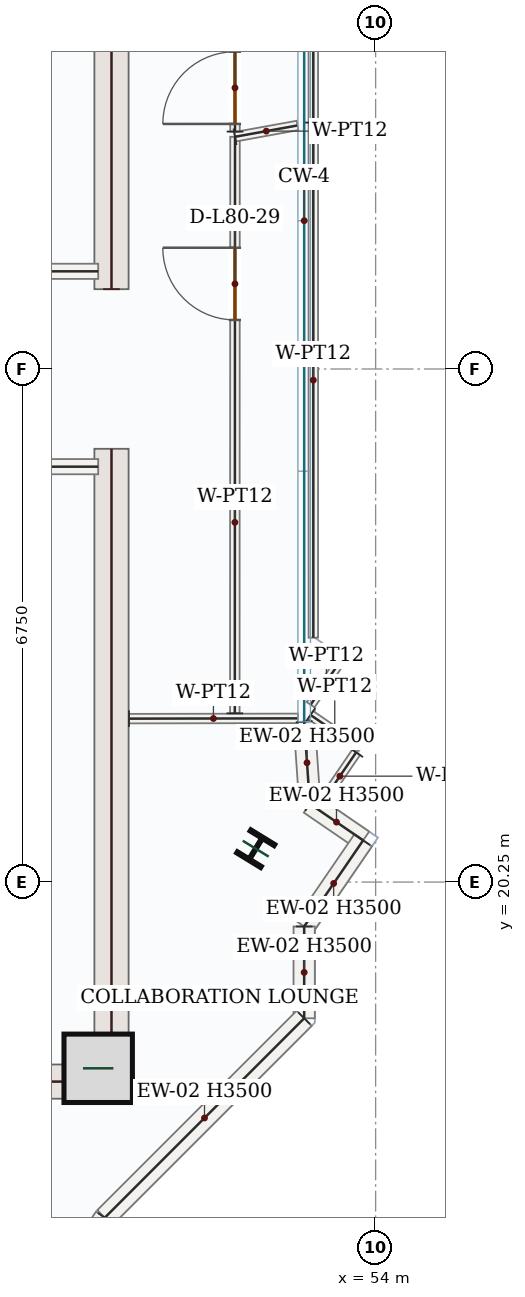
"""IFC4 building model, lengths in metres.
Left out: names, types, materials, properties, quantities, classifications, styles, units other than length and angle.
Written with IfcOpenShell. Run it as: python <this file> out.ifc"""

import sys

from ifc_helpers import new_model, si_unit, direction, frame, frame_2d, origin, origin_2d, place, context, subcontext, project, spatial, rectangle, i_section, extrude, source, transform, mapped, element, fill, save


model = new_model("IFC4")
c1 = context("Model", 3, precision=1e-05, world=origin(), true_north=direction((0.0, 1.0)))
c2 = subcontext(c1, "Body", "Model", "MODEL_VIEW")
j1 = project(units=[si_unit("LENGTHUNIT", "METRE"), si_unit("PLANEANGLEUNIT", "RADIAN")], contexts=[c1])
p1 = place(None, origin())
s1 = spatial("IfcSite", under=j1, at=p1, CompositionType="ELEMENT")
p2 = place(p1, origin())
s2 = spatial("IfcBuilding", under=s1, at=p2, CompositionType="ELEMENT")
p3 = place(p2, frame((0.0, 0.0, 331.05)))
s3 = spatial("IfcBuildingStorey", under=s2, at=p3, CompositionType="ELEMENT", Elevation=331.05)
m1 = source(origin(), c2, "Body", "SweptSolid", [
    extrude(rectangle(XDim=8.55, YDim=0.45, at=frame_2d((4.275, 0.0))), origin(), (0.0, 0.0, 1.0), 3.5),
])
for number, where, z_axis, x_axis in (
    (1, (50.525, 17.4, 0.0), (0.0, 0.0, 1.0), (0.0, 1.0, 0.0)),
    (2, (50.525, 28.05, 0.0), (0.0, 0.0, 1.0), (0.0, 1.0, 0.0)),
):
    element("IfcWall", number, at=place(p3, frame(where, z_axis=z_axis, x_axis=x_axis)), inside=s3, PredefinedType="SHEAR", context=c2, shape_type="MappedRepresentation", body=[
        mapped(m1, transform((0.0, 0.0, 0.0), x_axis=(1.0, 0.0, 0.0), y_axis=(0.0, 1.0, 0.0), z_axis=(0.0, 0.0, 1.0), scale=1.0)),
    ])
m2 = source(origin(), c2, "Body", "SweptSolid", [
    extrude(rectangle(XDim=7.1, YDim=0.45, at=frame_2d((3.55, 0.0))), origin(), (0.0, 0.0, 1.0), 3.5),
])
p4 = place(p3, frame((43.2, 17.625, 0.0), z_axis=(0.0, 0.0, 1.0), x_axis=(1.0, 0.0, 0.0)))
e3 = element("IfcWall", 3, at=p4, inside=s3, PredefinedType="SHEAR", context=c2, shape_type="MappedRepresentation", body=[
    mapped(m2, transform((0.0, 0.0, 0.0), x_axis=(1.0, 0.0, 0.0), y_axis=(0.0, 1.0, 0.0), z_axis=(0.0, 0.0, 1.0), scale=1.0)),
])
m3 = source(origin(), c2, "Body", "SweptSolid", [
    extrude(rectangle(XDim=0.9, YDim=0.9, at=origin_2d()), origin(), (0.0, 0.0, 1.0), 3.75),
])
p5 = place(p3, frame((50.35, 17.8, 0.0), z_axis=(0.0, 0.0, 1.0), x_axis=(1.0, 0.0, 0.0)))
e4 = element("IfcColumn", 4, at=p5, inside=s3, PredefinedType="COLUMN", context=c2, shape_type="MappedRepresentation", body=[
    mapped(m3, transform((0.0, 0.0, 0.0), x_axis=(1.0, 0.0, 0.0), y_axis=(0.0, 1.0, 0.0), z_axis=(0.0, 0.0, 1.0), scale=1.0)),
])
m4 = source(origin(), c2, "Body", "SweptSolid", [
    extrude(i_section(OverallWidth=0.369, OverallDepth=0.356, WebThickness=0.011, FlangeThickness=0.018, FilletRadius=0.018, at=origin_2d()), origin(), (0.0, 0.0, 1.0), 3.75),
])
p6 = place(p3, frame((52.423, 20.689, 0.0), z_axis=(0.0, 0.0, 1.0), x_axis=(-0.852640164354, 0.522498564716, 0.0)))
e5 = element("IfcColumn", 5, at=p6, inside=s3, PredefinedType="COLUMN", context=c2, shape_type="MappedRepresentation", body=[
    mapped(m4, transform((0.0, 0.0, 0.0), x_axis=(1.0, 0.0, 0.0), y_axis=(0.0, 1.0, 0.0), z_axis=(0.0, 0.0, 1.0), scale=1.0)),
])
m5 = source(origin(), c2, "Body", "SweptSolid", [
    extrude(rectangle(XDim=1.083, YDim=0.28, at=frame_2d((0.542, 0.0))), origin(), (0.0, 0.0, 1.0), 3.5),
])
p7 = place(p3, frame((53.06, 22.36, 0.0), z_axis=(0.0, 0.0, 1.0), x_axis=(0.068717036618, -0.997636190642, 0.0)))
e6 = element("IfcWall", 6, at=p7, inside=s3, PredefinedType="SOLIDWALL", context=c2, shape_type="MappedRepresentation", body=[
    mapped(m5, transform((0.0, 0.0, 0.0), x_axis=(1.0, 0.0, 0.0), y_axis=(0.0, 1.0, 0.0), z_axis=(0.0, 0.0, 1.0), scale=1.0)),
])
m6 = source(origin(), c2, "Body", "SweptSolid", [
    extrude(rectangle(XDim=0.85, YDim=0.28, at=frame_2d((0.425, 0.0))), origin(), (0.0, 0.0, 1.0), 3.5),
])
p8 = place(p3, frame((53.135, 21.279, 0.0), z_axis=(0.0, 0.0, 1.0), x_axis=(0.825046459993, -0.565064897913, 0.0)))
e7 = element("IfcWall", 7, at=p8, inside=s3, PredefinedType="SOLIDWALL", context=c2, shape_type="MappedRepresentation", body=[
    mapped(m6, transform((0.0, 0.0, 0.0), x_axis=(1.0, 0.0, 0.0), y_axis=(0.0, 1.0, 0.0), z_axis=(0.0, 0.0, 1.0), scale=1.0)),
])
m7 = source(origin(), c2, "Body", "SweptSolid", [
    extrude(rectangle(XDim=1.373, YDim=0.28, at=frame_2d((0.687, 0.0))), origin(), (0.0, 0.0, 1.0), 3.5),
])
p9 = place(p3, frame((53.836, 20.799, 0.0), z_axis=(0.0, 0.0, 1.0), x_axis=(-0.564875120833, -0.825176404088, 0.0)))
e8 = element("IfcWall", 8, at=p9, inside=s3, PredefinedType="SOLIDWALL", context=c2, shape_type="MappedRepresentation", body=[
    mapped(m7, transform((0.0, 0.0, 0.0), x_axis=(1.0, 0.0, 0.0), y_axis=(0.0, 1.0, 0.0), z_axis=(0.0, 0.0, 1.0), scale=1.0)),
])
m8 = source(origin(), c2, "Body", "SweptSolid", [
    extrude(rectangle(XDim=1.208, YDim=0.28, at=frame_2d((0.604, 0.0))), origin(), (0.0, 0.0, 1.0), 3.5),
])
p10 = place(p3, frame((53.06, 19.666, 0.0), z_axis=(0.0, 0.0, 1.0), x_axis=(0.0, -1.0, 0.0)))
e9 = element("IfcWall", 9, at=p10, inside=s3, PredefinedType="SOLIDWALL", context=c2, shape_type="MappedRepresentation", body=[
    mapped(m8, transform((0.0, 0.0, 0.0), x_axis=(1.0, 0.0, 0.0), y_axis=(0.0, 1.0, 0.0), z_axis=(0.0, 0.0, 1.0), scale=1.0)),
])
m9 = source(origin(), c2, "Body", "SweptSolid", [
    extrude(rectangle(XDim=3.709, YDim=0.28, at=frame_2d((1.855, 0.0))), origin(), (0.0, 0.0, 1.0), 3.5),
])
p11 = place(p3, frame((53.06, 18.458, 0.0), z_axis=(0.0, 0.0, 1.0), x_axis=(-0.707106781187, -0.707106781187, 0.0)))
e10 = element("IfcWall", 10, at=p11, inside=s3, PredefinedType="SOLIDWALL", context=c2, shape_type="MappedRepresentation", body=[
    mapped(m9, transform((0.0, 0.0, 0.0), x_axis=(1.0, 0.0, 0.0), y_axis=(0.0, 1.0, 0.0), z_axis=(0.0, 0.0, 1.0), scale=1.0)),
])
p12 = place(p3, frame((50.437, 15.835, 0.0), z_axis=(0.0, 0.0, 1.0), x_axis=(-0.564961879511, -0.825117006672, 0.0)))
e11 = element("IfcWall", 11, at=p12, inside=s3, PredefinedType="SOLIDWALL", context=c2, shape_type="SweptSolid", body=[
    extrude(rectangle(XDim=3.904, YDim=0.28, at=frame_2d((1.952, 0.0))), origin(), (0.0, 0.0, 1.0), 3.5),
])
p13 = place(p12, frame((1.202, 0.0, 0.85)))
e12 = element("IfcOpeningElement", 12, at=p13, cuts=e11, PredefinedType="OPENING", context=c2, shape_type="SweptSolid", body=[
    extrude(rectangle(XDim=1.5, YDim=1.5, at=frame_2d((0.75, 0.75))), frame((0.0, 0.15, 0.0), z_axis=(0.0, -1.0, 0.0), x_axis=(1.0, 0.0, 0.0)), (0.0, 0.0, 1.0), 0.3),
])
m10 = source(origin(), c2, "Body", "SweptSolid", [
    extrude(rectangle(XDim=4.25, YDim=0.2, at=frame_2d((2.125, 0.0))), origin(), (0.0, 0.0, 1.0), 3.5),
])
for number, where, z_axis, x_axis in (
    (13, (46.1, 25.715, 0.0), (0.0, 0.0, 1.0), (1.0, 0.0, 0.0)),
    (14, (46.1, 28.285, 0.0), (0.0, 0.0, 1.0), (1.0, 0.0, 0.0)),
):
    element("IfcWall", number, at=place(p3, frame(where, z_axis=z_axis, x_axis=x_axis)), inside=s3, PredefinedType="SOLIDWALL", context=c2, shape_type="MappedRepresentation", body=[
        mapped(m10, transform((0.0, 0.0, 0.0), x_axis=(1.0, 0.0, 0.0), y_axis=(0.0, 1.0, 0.0), z_axis=(0.0, 0.0, 1.0), scale=1.0)),
    ])
m11 = source(origin(), c2, "Body", "SweptSolid", [
    extrude(rectangle(XDim=2.223, YDim=0.125, at=frame_2d((1.111, 0.0))), origin(), (0.0, 0.0, 1.0), 3.5),
])
p14 = place(p3, frame((50.755, 22.4, 0.0), z_axis=(0.0, 0.0, 1.0), x_axis=(0.999998642665, 0.00164762518, 0.0)))
e15 = element("IfcWall", 15, at=p14, inside=s3, PredefinedType="PARTITIONING", context=c2, shape_type="MappedRepresentation", body=[
    mapped(m11, transform((0.0, 0.0, 0.0), x_axis=(1.0, 0.0, 0.0), y_axis=(0.0, 1.0, 0.0), z_axis=(0.0, 0.0, 1.0), scale=1.0)),
])
p15 = place(p3, frame((52.147, 22.47, 0.0), z_axis=(0.0, 0.0, 1.0), x_axis=(0.000321874581, 0.999999948198, 0.0)))
e16 = element("IfcWall", 16, at=p15, inside=s3, PredefinedType="PARTITIONING", context=c2, shape_type="SweptSolid", body=[
    extrude(rectangle(XDim=7.585, YDim=0.125, at=frame_2d((3.792, 0.0))), origin(), (0.0, 0.0, 1.0), 3.5),
])
p16 = place(p15, frame((5.175, 0.0, 0.0)))
e17 = element("IfcOpeningElement", 17, at=p16, cuts=e16, PredefinedType="OPENING", context=c2, shape_type="SweptSolid", body=[
    extrude(rectangle(XDim=0.95, YDim=2.15, at=frame_2d((0.475, 1.075))), frame((0.0, 0.073, 0.0), z_axis=(0.0, -1.0, 0.0), x_axis=(1.0, 0.0, 0.0)), (0.0, 0.0, 1.0), 0.145),
])
m12 = source(origin(), c2, "Body", "SweptSolid", [
    extrude(rectangle(XDim=0.836, YDim=0.125, at=frame_2d((0.418, 0.0))), origin(), (0.0, 0.0, 1.0), 3.5),
])
p17 = place(p3, frame((52.15, 30.055, 0.0), z_axis=(0.0, 0.0, 1.0), x_axis=(0.983949253333, 0.178448499195, 0.0)))
e18 = element("IfcWall", 18, at=p17, inside=s3, PredefinedType="PARTITIONING", context=c2, shape_type="MappedRepresentation", body=[
    mapped(m12, transform((0.0, 0.0, 0.0), x_axis=(1.0, 0.0, 0.0), y_axis=(0.0, 1.0, 0.0), z_axis=(0.0, 0.0, 1.0), scale=1.0)),
])
m13 = source(origin(), c2, "Body", "SweptSolid", [
    extrude(rectangle(XDim=6.777, YDim=0.125, at=frame_2d((3.388, 0.0))), origin(), (0.0, 0.0, 1.0), 3.5),
])
p18 = place(p3, frame((53.18, 30.242, 0.0), z_axis=(0.0, 0.0, 1.0), x_axis=(7.2053896e-05, -0.999999997404, 0.0)))
e19 = element("IfcWall", 19, at=p18, inside=s3, PredefinedType="PARTITIONING", context=c2, shape_type="MappedRepresentation", body=[
    mapped(m13, transform((0.0, 0.0, 0.0), x_axis=(1.0, 0.0, 0.0), y_axis=(0.0, 1.0, 0.0), z_axis=(0.0, 0.0, 1.0), scale=1.0)),
])
m14 = source(origin(), c2, "Body", "SweptSolid", [
    extrude(rectangle(XDim=0.738, YDim=0.125, at=frame_2d((0.369, 0.0))), origin(), (0.0, 0.0, 1.0), 3.5),
])
p19 = place(p3, frame((53.56, 23.193, 0.0), z_axis=(0.0, 0.0, 1.0), x_axis=(-0.563069892808, -0.826409278634, 0.0)))
e20 = element("IfcWall", 20, at=p19, inside=s3, PredefinedType="PARTITIONING", context=c2, shape_type="MappedRepresentation", body=[
    mapped(m14, transform((0.0, 0.0, 0.0), x_axis=(1.0, 0.0, 0.0), y_axis=(0.0, 1.0, 0.0), z_axis=(0.0, 0.0, 1.0), scale=1.0)),
])
m15 = source(origin(), c2, "Body", "SweptSolid", [
    extrude(rectangle(XDim=0.773, YDim=0.125, at=frame_2d((0.387, 0.0))), origin(), (0.0, 0.0, 1.0), 3.5),
])
p20 = place(p3, frame((53.143, 22.448, 0.0), z_axis=(0.0, 0.0, 1.0), x_axis=(0.825237562889, -0.56478576894, 0.0)))
e21 = element("IfcWall", 21, at=p20, inside=s3, PredefinedType="PARTITIONING", context=c2, shape_type="MappedRepresentation", body=[
    mapped(m15, transform((0.0, 0.0, 0.0), x_axis=(1.0, 0.0, 0.0), y_axis=(0.0, 1.0, 0.0), z_axis=(0.0, 0.0, 1.0), scale=1.0)),
])
m16 = source(origin(), c2, "Body", "SweptSolid", [
    extrude(rectangle(XDim=0.757, YDim=0.125, at=frame_2d((0.379, 0.0))), origin(), (0.0, 0.0, 1.0), 3.5),
])
p21 = place(p3, frame((53.743, 21.956, 0.0), z_axis=(0.0, 0.0, 1.0), x_axis=(-0.564406554972, -0.825496965896, 0.0)))
e22 = element("IfcWall", 22, at=p21, inside=s3, PredefinedType="PARTITIONING", context=c2, shape_type="MappedRepresentation", body=[
    mapped(m16, transform((0.0, 0.0, 0.0), x_axis=(1.0, 0.0, 0.0), y_axis=(0.0, 1.0, 0.0), z_axis=(0.0, 0.0, 1.0), scale=1.0)),
])
m17 = source(origin(), c2, "Body", "SweptSolid", [
    extrude(rectangle(XDim=5.35, YDim=0.125, at=frame_2d((2.675, 0.0))), origin(), (0.0, 0.0, 1.0), 3.5),
])
p22 = place(p3, frame((53.18, 35.592, 0.0), z_axis=(0.0, 0.0, 1.0), x_axis=(0.0, -1.0, 0.0)))
e23 = element("IfcWall", 23, at=p22, inside=s3, PredefinedType="PARTITIONING", context=c2, shape_type="MappedRepresentation", body=[
    mapped(m17, transform((0.0, 0.0, 0.0), x_axis=(1.0, 0.0, 0.0), y_axis=(0.0, 1.0, 0.0), z_axis=(0.0, 0.0, 1.0), scale=1.0)),
])
p23 = place(p3, frame((52.15, 30.124, 0.0), z_axis=(0.0, 0.0, 1.0), x_axis=(-0.000520201074, 0.999999864695, 0.0)))
e24 = element("IfcWall", 24, at=p23, inside=s3, PredefinedType="PARTITIONING", context=c2, shape_type="SweptSolid", body=[
    extrude(rectangle(XDim=1.408, YDim=0.125, at=frame_2d((0.704, 0.0))), origin(), (0.0, 0.0, 1.0), 3.5),
])
p24 = place(p23, frame((0.101, 0.0, 0.0)))
e25 = element("IfcOpeningElement", 25, at=p24, cuts=e24, PredefinedType="OPENING", context=c2, shape_type="SweptSolid", body=[
    extrude(rectangle(XDim=0.95, YDim=2.15, at=frame_2d((0.475, 1.075))), frame((0.0, 0.073, 0.0), z_axis=(0.0, -1.0, 0.0), x_axis=(1.0, 0.0, 0.0)), (0.0, 0.0, 1.0), 0.145),
])
m18 = source(origin(), c2, "Body", "SweptSolid", [
    extrude(rectangle(XDim=0.95, YDim=2.15, at=frame_2d((0.475, 1.075))), frame((0.0, 0.025, 0.0), z_axis=(0.0, -1.0, 0.0), x_axis=(1.0, 0.0, 0.0)), (0.0, 0.0, 1.0), 0.05),
])
p25 = place(p24, origin())
e26 = element("IfcDoor", 26, at=p25, inside=s3, OperationType="SINGLE_SWING_LEFT", PredefinedType="DOOR", context=c2, shape_type="MappedRepresentation", body=[
    mapped(m18, transform((0.0, 0.0, 0.0), x_axis=(1.0, 0.0, 0.0), y_axis=(0.0, 1.0, 0.0), z_axis=(0.0, 0.0, 1.0), scale=1.0)),
])
fill(e25, e26)
p26 = place(p16, origin())
e27 = element("IfcDoor", 27, at=p26, inside=s3, OperationType="SINGLE_SWING_RIGHT", PredefinedType="DOOR", context=c2, shape_type="MappedRepresentation", body=[
    mapped(m18, transform((0.0, 0.0, 0.0), x_axis=(1.0, 0.0, 0.0), y_axis=(0.0, 1.0, 0.0), z_axis=(0.0, 0.0, 1.0), scale=1.0)),
])
fill(e17, e27)
save(model, sys.argv[1])
